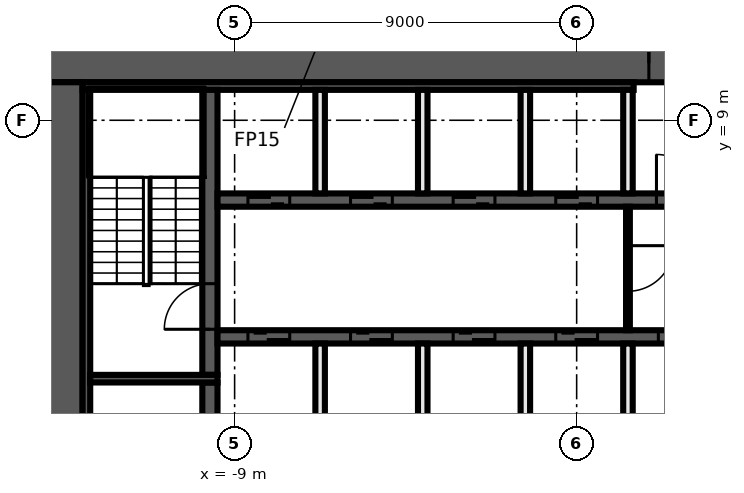
"""IFC4 building model, lengths in metres.
Left out: names, types, materials, properties, quantities, classifications, styles, units other than length and angle.
Written with IfcOpenShell. Run it as: python <this file> out.ifc"""

import sys

from ifc_helpers import new_model, si_unit, direction, frame, frame_2d, origin, place, context, subcontext, project, spatial, rectangle, extrude, element, fill, save


model = new_model("IFC4")
c1 = context("Model", 3, precision=1e-05, world=origin(), true_north=direction((0.0, 1.0)))
c2 = subcontext(c1, "Body", "Model", "MODEL_VIEW")
j1 = project(units=[si_unit("LENGTHUNIT", "METRE"), si_unit("PLANEANGLEUNIT", "RADIAN")], contexts=[c1])
p1 = place(None, origin())
s1 = spatial("IfcSite", under=j1, at=p1, CompositionType="ELEMENT")
p2 = place(p1, origin())
s2 = spatial("IfcBuilding", under=s1, at=p2, CompositionType="ELEMENT")
p3 = place(p2, frame((0.0, 0.0, 106.3)))
s3 = spatial("IfcBuildingStorey", under=s2, at=p3, CompositionType="ELEMENT", Elevation=106.3)
p4 = place(p3, frame((-14.0, 10.5, 0.0), z_axis=(0.0, 0.0, 1.0), x_axis=(1.0, 0.0, 0.0)))
e1 = element("IfcWall", 1, at=p4, inside=s3, PredefinedType="SHEAR", context=c2, shape_type="SweptSolid", body=[
    extrude(rectangle(XDim=28.0, YDim=1.0, at=frame_2d((14.0, 0.0))), origin(), (0.0, 0.0, 1.0), 3.3),
])
p5 = place(p4, frame((15.9, 0.0, 0.0)))
e2 = element("IfcOpeningElement", 2, at=p5, cuts=e1, PredefinedType="OPENING", context=c2, shape_type="SweptSolid", body=[
    extrude(rectangle(XDim=1.6, YDim=2.1, at=frame_2d((0.8, 1.05))), frame((0.0, 0.51, 0.0), z_axis=(0.0, -1.0, 0.0), x_axis=(1.0, 0.0, 0.0)), (0.0, 0.0, 1.0), 1.02),
])
p6 = place(p3, frame((-13.5, -10.0, 0.0), z_axis=(0.0, 0.0, 1.0), x_axis=(0.0, 1.0, 0.0)))
e3 = element("IfcWall", 3, at=p6, inside=s3, PredefinedType="SHEAR", context=c2, shape_type="SweptSolid", body=[
    extrude(rectangle(XDim=20.0, YDim=1.0, at=frame_2d((10.0, 0.0))), origin(), (0.0, 0.0, 1.0), 3.3),
])
p7 = place(p3, frame((-13.0, 9.9, 0.0), z_axis=(0.0, 0.0, 1.0), x_axis=(1.0, 0.0, 0.0)))
e4 = element("IfcWall", 4, at=p7, inside=s3, PredefinedType="SHEAR", context=c2, shape_type="SweptSolid", body=[
    extrude(rectangle(XDim=14.5, YDim=0.2, at=frame_2d((7.25, 0.0))), origin(), (0.0, 0.0, 1.0), 3.3),
])
p8 = place(p3, frame((-12.9, -9.8, 0.0), z_axis=(0.0, 0.0, 1.0), x_axis=(0.0, 1.0, 0.0)))
e5 = element("IfcWall", 5, at=p8, inside=s3, PredefinedType="SHEAR", context=c2, shape_type="SweptSolid", body=[
    extrude(rectangle(XDim=19.6, YDim=0.2, at=frame_2d((9.8, 0.0))), origin(), (0.0, 0.0, 1.0), 3.3),
])
p9 = place(p3, frame((-9.65, -2.1, 0.0), z_axis=(0.0, 0.0, 1.0), x_axis=(0.0, 1.0, 0.0)))
e6 = element("IfcWall", 6, at=p9, inside=s3, PredefinedType="SHEAR", context=c2, shape_type="SweptSolid", body=[
    extrude(rectangle(XDim=4.2, YDim=0.4, at=frame_2d((2.1, 0.0))), origin(), (0.0, 0.0, 1.0), 3.3),
])
p10 = place(p3, frame((-9.65, 2.3, 0.0), z_axis=(0.0, 0.0, 1.0), x_axis=(0.0, 1.0, 0.0)))
e7 = element("IfcWall", 7, at=p10, inside=s3, PredefinedType="SHEAR", context=c2, shape_type="SweptSolid", body=[
    extrude(rectangle(XDim=7.5, YDim=0.4, at=frame_2d((3.75, 0.0))), origin(), (0.0, 0.0, 1.0), 3.3),
])
p11 = place(p10, frame((1.2, 0.0, 0.0)))
e8 = element("IfcOpeningElement", 8, at=p11, cuts=e7, PredefinedType="OPENING", context=c2, shape_type="SweptSolid", body=[
    extrude(rectangle(XDim=1.2, YDim=2.1, at=frame_2d((0.6, 1.05))), frame((0.0, 0.21, 0.0), z_axis=(0.0, -1.0, 0.0), x_axis=(1.0, 0.0, 0.0)), (0.0, 0.0, 1.0), 0.42),
])
p12 = place(p3, frame((-9.45, 2.2, 0.0), z_axis=(0.0, 0.0, 1.0), x_axis=(-1.0, 0.0, 0.0)))
e9 = element("IfcWall", 9, at=p12, inside=s3, PredefinedType="SHEAR", context=c2, shape_type="SweptSolid", body=[
    extrude(rectangle(XDim=3.35, YDim=0.2, at=frame_2d((1.675, 0.0))), origin(), (0.0, 0.0, 1.0), 3.3),
])
p13 = place(p3, frame((-9.45, 6.9, 0.0), z_axis=(0.0, 0.0, 1.0), x_axis=(1.0, 0.0, 0.0)))
e10 = element("IfcWall", 10, at=p13, inside=s3, PredefinedType="SHEAR", context=c2, shape_type="SweptSolid", body=[
    extrude(rectangle(XDim=18.9, YDim=0.35, at=frame_2d((9.45, 0.0))), origin(), (0.0, 0.0, 1.0), 3.3),
])
p14 = place(p13, frame((0.8, 0.0, 0.0)))
e11 = element("IfcOpeningElement", 11, at=p14, cuts=e10, PredefinedType="OPENING", context=c2, shape_type="SweptSolid", body=[
    extrude(rectangle(XDim=1.1, YDim=2.1, at=frame_2d((0.55, 1.05))), frame((0.0, 0.185, 0.0), z_axis=(0.0, -1.0, 0.0), x_axis=(1.0, 0.0, 0.0)), (0.0, 0.0, 1.0), 0.37),
])
p15 = place(p13, frame((3.5, 0.0, 0.0)))
e12 = element("IfcOpeningElement", 12, at=p15, cuts=e10, PredefinedType="OPENING", context=c2, shape_type="SweptSolid", body=[
    extrude(rectangle(XDim=1.1, YDim=2.1, at=frame_2d((0.55, 1.05))), frame((0.0, 0.185, 0.0), z_axis=(0.0, -1.0, 0.0), x_axis=(1.0, 0.0, 0.0)), (0.0, 0.0, 1.0), 0.37),
])
p16 = place(p13, frame((6.2, 0.0, 0.0)))
e13 = element("IfcOpeningElement", 13, at=p16, cuts=e10, PredefinedType="OPENING", context=c2, shape_type="SweptSolid", body=[
    extrude(rectangle(XDim=1.1, YDim=2.1, at=frame_2d((0.55, 1.05))), frame((0.0, 0.185, 0.0), z_axis=(0.0, -1.0, 0.0), x_axis=(1.0, 0.0, 0.0)), (0.0, 0.0, 1.0), 0.37),
])
p17 = place(p13, frame((8.9, 0.0, 0.0)))
e14 = element("IfcOpeningElement", 14, at=p17, cuts=e10, PredefinedType="OPENING", context=c2, shape_type="SweptSolid", body=[
    extrude(rectangle(XDim=1.1, YDim=2.1, at=frame_2d((0.55, 1.05))), frame((0.0, 0.185, 0.0), z_axis=(0.0, -1.0, 0.0), x_axis=(1.0, 0.0, 0.0)), (0.0, 0.0, 1.0), 0.37),
])
p18 = place(p13, frame((11.55, 0.0, 0.0)))
e15 = element("IfcOpeningElement", 15, at=p18, cuts=e10, PredefinedType="OPENING", context=c2, shape_type="SweptSolid", body=[
    extrude(rectangle(XDim=1.2, YDim=2.1, at=frame_2d((0.6, 1.05))), frame((0.0, 0.185, 0.0), z_axis=(0.0, -1.0, 0.0), x_axis=(1.0, 0.0, 0.0)), (0.0, 0.0, 1.0), 0.37),
])
p19 = place(p13, frame((14.3, 0.0, 0.0)))
e16 = element("IfcOpeningElement", 16, at=p19, cuts=e10, PredefinedType="OPENING", context=c2, shape_type="SweptSolid", body=[
    extrude(rectangle(XDim=1.1, YDim=2.1, at=frame_2d((0.55, 1.05))), frame((0.0, 0.185, 0.0), z_axis=(0.0, -1.0, 0.0), x_axis=(1.0, 0.0, 0.0)), (0.0, 0.0, 1.0), 0.37),
])
p20 = place(p13, frame((17.0, 0.0, 0.0)))
e17 = element("IfcOpeningElement", 17, at=p20, cuts=e10, PredefinedType="OPENING", context=c2, shape_type="SweptSolid", body=[
    extrude(rectangle(XDim=1.1, YDim=2.1, at=frame_2d((0.55, 1.05))), frame((0.0, 0.185, 0.0), z_axis=(0.0, -1.0, 0.0), x_axis=(1.0, 0.0, 0.0)), (0.0, 0.0, 1.0), 0.37),
])
p21 = place(p3, frame((9.45, 3.3, 0.0), z_axis=(0.0, 0.0, 1.0), x_axis=(-1.0, 0.0, 0.0)))
e18 = element("IfcWall", 18, at=p21, inside=s3, PredefinedType="SHEAR", context=c2, shape_type="SweptSolid", body=[
    extrude(rectangle(XDim=18.9, YDim=0.35, at=frame_2d((9.45, 0.0))), origin(), (0.0, 0.0, 1.0), 3.3),
])
p22 = place(p21, frame((17.0, 0.0, 0.0)))
e19 = element("IfcOpeningElement", 19, at=p22, cuts=e18, PredefinedType="OPENING", context=c2, shape_type="SweptSolid", body=[
    extrude(rectangle(XDim=1.1, YDim=2.1, at=frame_2d((0.55, 1.05))), frame((0.0, 0.185, 0.0), z_axis=(0.0, -1.0, 0.0), x_axis=(1.0, 0.0, 0.0)), (0.0, 0.0, 1.0), 0.37),
])
p23 = place(p21, frame((14.3, 0.0, 0.0)))
e20 = element("IfcOpeningElement", 20, at=p23, cuts=e18, PredefinedType="OPENING", context=c2, shape_type="SweptSolid", body=[
    extrude(rectangle(XDim=1.1, YDim=2.1, at=frame_2d((0.55, 1.05))), frame((0.0, 0.185, 0.0), z_axis=(0.0, -1.0, 0.0), x_axis=(1.0, 0.0, 0.0)), (0.0, 0.0, 1.0), 0.37),
])
p24 = place(p21, frame((11.6, 0.0, 0.0)))
e21 = element("IfcOpeningElement", 21, at=p24, cuts=e18, PredefinedType="OPENING", context=c2, shape_type="SweptSolid", body=[
    extrude(rectangle(XDim=1.1, YDim=2.1, at=frame_2d((0.55, 1.05))), frame((0.0, 0.185, 0.0), z_axis=(0.0, -1.0, 0.0), x_axis=(1.0, 0.0, 0.0)), (0.0, 0.0, 1.0), 0.37),
])
p25 = place(p21, frame((8.9, 0.0, 0.0)))
e22 = element("IfcOpeningElement", 22, at=p25, cuts=e18, PredefinedType="OPENING", context=c2, shape_type="SweptSolid", body=[
    extrude(rectangle(XDim=1.1, YDim=2.1, at=frame_2d((0.55, 1.05))), frame((0.0, 0.185, 0.0), z_axis=(0.0, -1.0, 0.0), x_axis=(1.0, 0.0, 0.0)), (0.0, 0.0, 1.0), 0.37),
])
p26 = place(p21, frame((6.2, 0.0, 0.0)))
e23 = element("IfcOpeningElement", 23, at=p26, cuts=e18, PredefinedType="OPENING", context=c2, shape_type="SweptSolid", body=[
    extrude(rectangle(XDim=1.1, YDim=2.1, at=frame_2d((0.55, 1.05))), frame((0.0, 0.185, 0.0), z_axis=(0.0, -1.0, 0.0), x_axis=(1.0, 0.0, 0.0)), (0.0, 0.0, 1.0), 0.37),
])
p27 = place(p21, frame((3.5, 0.0, 0.0)))
e24 = element("IfcOpeningElement", 24, at=p27, cuts=e18, PredefinedType="OPENING", context=c2, shape_type="SweptSolid", body=[
    extrude(rectangle(XDim=1.1, YDim=2.1, at=frame_2d((0.55, 1.05))), frame((0.0, 0.185, 0.0), z_axis=(0.0, -1.0, 0.0), x_axis=(1.0, 0.0, 0.0)), (0.0, 0.0, 1.0), 0.37),
])
p28 = place(p21, frame((0.9, 0.0, 0.0)))
e25 = element("IfcOpeningElement", 25, at=p28, cuts=e18, PredefinedType="OPENING", context=c2, shape_type="SweptSolid", body=[
    extrude(rectangle(XDim=0.9, YDim=2.1, at=frame_2d((0.45, 1.05))), frame((0.0, 0.185, 0.0), z_axis=(0.0, -1.0, 0.0), x_axis=(1.0, 0.0, 0.0)), (0.0, 0.0, 1.0), 0.37),
])
p29 = place(p3, frame((1.35, 6.725, 0.0), z_axis=(0.0, 0.0, 1.0), x_axis=(0.0, -1.0, 0.0)))
e26 = element("IfcWall", 26, at=p29, inside=s3, PredefinedType="PARTITIONING", context=c2, shape_type="SweptSolid", body=[
    extrude(rectangle(XDim=3.25, YDim=0.1, at=frame_2d((1.625, 0.0))), origin(), (0.0, 0.0, 1.0), 3.3),
])
p30 = place(p29, frame((1.025, 0.0, 0.0)))
e27 = element("IfcOpeningElement", 27, at=p30, cuts=e26, PredefinedType="OPENING", context=c2, shape_type="SweptSolid", body=[
    extrude(rectangle(XDim=1.2, YDim=2.1, at=frame_2d((0.6, 1.05))), frame((0.0, 0.06, 0.0), z_axis=(0.0, -1.0, 0.0), x_axis=(1.0, 0.0, 0.0)), (0.0, 0.0, 1.0), 0.12),
])
for number, where, z_axis, x_axis in (
    (28, (1.35, 0.4, 0.0), (0.0, 0.0, 1.0), (0.0, 1.0, 0.0)),
    (29, (1.35, 7.075, 0.0), (0.0, 0.0, 1.0), (0.0, 1.0, 0.0)),
    (30, (-1.35, 0.4, 0.0), (0.0, 0.0, 1.0), (0.0, 1.0, 0.0)),
    (31, (-1.35, 7.075, 0.0), (0.0, 0.0, 1.0), (0.0, 1.0, 0.0)),
    (32, (-4.05, 0.4, 0.0), (0.0, 0.0, 1.0), (0.0, 1.0, 0.0)),
    (33, (-4.05, 7.075, 0.0), (0.0, 0.0, 1.0), (0.0, 1.0, 0.0)),
    (34, (-6.75, 0.4, 0.0), (0.0, 0.0, 1.0), (0.0, 1.0, 0.0)),
    (35, (-6.75, 7.075, 0.0), (0.0, 0.0, 1.0), (0.0, 1.0, 0.0)),
):
    element("IfcWall", number, at=place(p3, frame(where, z_axis=z_axis, x_axis=x_axis)), inside=s3, PredefinedType="SOLIDWALL", context=c2, shape_type="SweptSolid", body=[
        extrude(rectangle(XDim=2.725, YDim=0.25, at=frame_2d((1.363, 0.0))), origin(), (0.0, 0.0, 1.0), 3.3),
    ])
p31 = place(p14, origin())
e36 = element("IfcDoor", 36, at=p31, inside=s3, OperationType="DOUBLE_DOOR_SLIDING", PredefinedType="DOOR", context=c2, shape_type="SweptSolid", body=[
    extrude(rectangle(XDim=1.1, YDim=2.1, at=frame_2d((0.55, 1.05))), frame((0.0, 0.025, 0.0), z_axis=(0.0, -1.0, 0.0), x_axis=(1.0, 0.0, 0.0)), (0.0, 0.0, 1.0), 0.05),
])
fill(e11, e36)
p32 = place(p15, origin())
e37 = element("IfcDoor", 37, at=p32, inside=s3, OperationType="DOUBLE_DOOR_SLIDING", PredefinedType="DOOR", context=c2, shape_type="SweptSolid", body=[
    extrude(rectangle(XDim=1.1, YDim=2.1, at=frame_2d((0.55, 1.05))), frame((0.0, 0.025, 0.0), z_axis=(0.0, -1.0, 0.0), x_axis=(1.0, 0.0, 0.0)), (0.0, 0.0, 1.0), 0.05),
])
fill(e12, e37)
p33 = place(p16, origin())
e38 = element("IfcDoor", 38, at=p33, inside=s3, OperationType="DOUBLE_DOOR_SLIDING", PredefinedType="DOOR", context=c2, shape_type="SweptSolid", body=[
    extrude(rectangle(XDim=1.1, YDim=2.1, at=frame_2d((0.55, 1.05))), frame((0.0, 0.025, 0.0), z_axis=(0.0, -1.0, 0.0), x_axis=(1.0, 0.0, 0.0)), (0.0, 0.0, 1.0), 0.05),
])
fill(e13, e38)
p34 = place(p17, origin())
e39 = element("IfcDoor", 39, at=p34, inside=s3, OperationType="DOUBLE_DOOR_SLIDING", PredefinedType="DOOR", context=c2, shape_type="SweptSolid", body=[
    extrude(rectangle(XDim=1.1, YDim=2.1, at=frame_2d((0.55, 1.05))), frame((0.0, 0.025, 0.0), z_axis=(0.0, -1.0, 0.0), x_axis=(1.0, 0.0, 0.0)), (0.0, 0.0, 1.0), 0.05),
])
fill(e14, e39)
p35 = place(p5, origin())
e40 = element("IfcDoor", 40, at=p35, inside=s3, OperationType="DOUBLE_DOOR_SINGLE_SWING", PredefinedType="DOOR", context=c2, shape_type="SweptSolid", body=[
    extrude(rectangle(XDim=1.6, YDim=2.1, at=frame_2d((0.8, 1.05))), frame((0.0, 0.025, 0.0), z_axis=(0.0, -1.0, 0.0), x_axis=(1.0, 0.0, 0.0)), (0.0, 0.0, 1.0), 0.05),
])
fill(e2, e40)
p36 = place(p18, origin())
e41 = element("IfcDoor", 41, at=p36, inside=s3, OperationType="SINGLE_SWING_LEFT", PredefinedType="DOOR", context=c2, shape_type="SweptSolid", body=[
    extrude(rectangle(XDim=1.2, YDim=2.1, at=frame_2d((0.6, 1.05))), frame((0.0, 0.025, 0.0), z_axis=(0.0, -1.0, 0.0), x_axis=(1.0, 0.0, 0.0)), (0.0, 0.0, 1.0), 0.05),
])
fill(e15, e41)
p37 = place(p22, origin())
e42 = element("IfcDoor", 42, at=p37, inside=s3, OperationType="DOUBLE_DOOR_SLIDING", PredefinedType="DOOR", context=c2, shape_type="SweptSolid", body=[
    extrude(rectangle(XDim=1.1, YDim=2.1, at=frame_2d((0.55, 1.05))), frame((0.0, 0.025, 0.0), z_axis=(0.0, -1.0, 0.0), x_axis=(1.0, 0.0, 0.0)), (0.0, 0.0, 1.0), 0.05),
])
fill(e19, e42)
p38 = place(p23, origin())
e43 = element("IfcDoor", 43, at=p38, inside=s3, OperationType="DOUBLE_DOOR_SLIDING", PredefinedType="DOOR", context=c2, shape_type="SweptSolid", body=[
    extrude(rectangle(XDim=1.1, YDim=2.1, at=frame_2d((0.55, 1.05))), frame((0.0, 0.025, 0.0), z_axis=(0.0, -1.0, 0.0), x_axis=(1.0, 0.0, 0.0)), (0.0, 0.0, 1.0), 0.05),
])
fill(e20, e43)
p39 = place(p24, origin())
e44 = element("IfcDoor", 44, at=p39, inside=s3, OperationType="DOUBLE_DOOR_SLIDING", PredefinedType="DOOR", context=c2, shape_type="SweptSolid", body=[
    extrude(rectangle(XDim=1.1, YDim=2.1, at=frame_2d((0.55, 1.05))), frame((0.0, 0.025, 0.0), z_axis=(0.0, -1.0, 0.0), x_axis=(1.0, 0.0, 0.0)), (0.0, 0.0, 1.0), 0.05),
])
fill(e21, e44)
p40 = place(p25, origin())
e45 = element("IfcDoor", 45, at=p40, inside=s3, OperationType="DOUBLE_DOOR_SLIDING", PredefinedType="DOOR", context=c2, shape_type="SweptSolid", body=[
    extrude(rectangle(XDim=1.1, YDim=2.1, at=frame_2d((0.55, 1.05))), frame((0.0, 0.025, 0.0), z_axis=(0.0, -1.0, 0.0), x_axis=(1.0, 0.0, 0.0)), (0.0, 0.0, 1.0), 0.05),
])
fill(e22, e45)
p41 = place(p26, origin())
e46 = element("IfcDoor", 46, at=p41, inside=s3, OperationType="DOUBLE_DOOR_SLIDING", PredefinedType="DOOR", context=c2, shape_type="SweptSolid", body=[
    extrude(rectangle(XDim=1.1, YDim=2.1, at=frame_2d((0.55, 1.05))), frame((0.0, 0.025, 0.0), z_axis=(0.0, -1.0, 0.0), x_axis=(1.0, 0.0, 0.0)), (0.0, 0.0, 1.0), 0.05),
])
fill(e23, e46)
p42 = place(p11, origin())
e47 = element("IfcDoor", 47, at=p42, inside=s3, OperationType="SINGLE_SWING_RIGHT", PredefinedType="DOOR", context=c2, shape_type="SweptSolid", body=[
    extrude(rectangle(XDim=1.2, YDim=2.1, at=frame_2d((0.6, 1.05))), frame((0.0, 0.025, 0.0), z_axis=(0.0, -1.0, 0.0), x_axis=(1.0, 0.0, 0.0)), (0.0, 0.0, 1.0), 0.05),
])
fill(e8, e47)
p43 = place(p30, origin())
e48 = element("IfcDoor", 48, at=p43, inside=s3, OperationType="SINGLE_SWING_LEFT", PredefinedType="DOOR", context=c2, shape_type="SweptSolid", body=[
    extrude(rectangle(XDim=1.2, YDim=2.1, at=frame_2d((0.6, 1.05))), frame((0.0, 0.025, 0.0), z_axis=(0.0, -1.0, 0.0), x_axis=(1.0, 0.0, 0.0)), (0.0, 0.0, 1.0), 0.05),
])
fill(e27, e48)
save(model, sys.argv[1])
